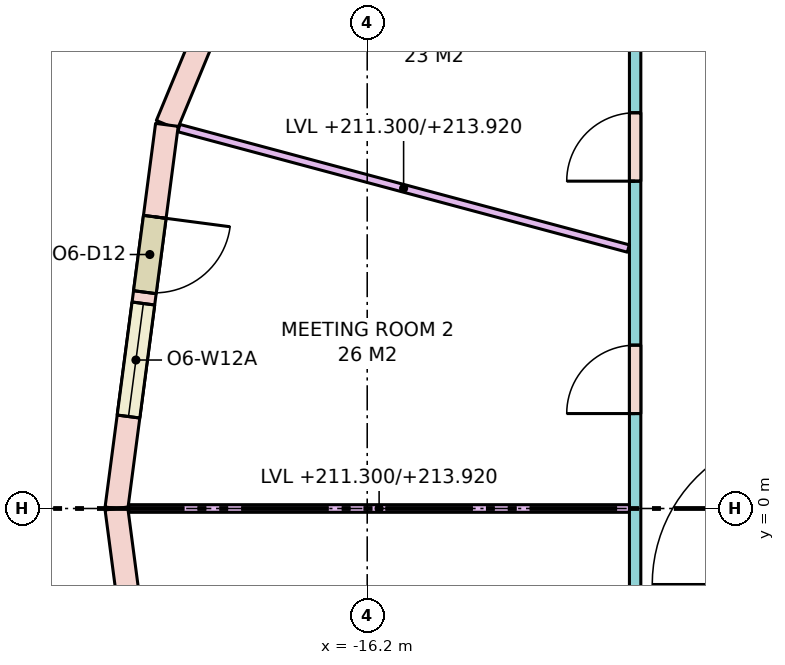
"""IFC4 building model, lengths in metres.
Left out: names, types, materials, properties, quantities, classifications, styles, units other than length and angle.
Written with IfcOpenShell. Run it as: python <this file> out.ifc"""

import sys

from ifc_helpers import new_model, si_unit, direction, frame, frame_2d, origin, place, context, subcontext, project, spatial, rectangle, extrude, element, fill, save


model = new_model("IFC4")
c1 = context("Model", 3, precision=1e-05, world=origin(), true_north=direction((0.0, 1.0)))
c2 = subcontext(c1, "Body", "Model", "MODEL_VIEW")
j1 = project(units=[si_unit("LENGTHUNIT", "METRE"), si_unit("PLANEANGLEUNIT", "RADIAN")], contexts=[c1])
p1 = place(None, origin())
s1 = spatial("IfcSite", under=j1, at=p1, CompositionType="ELEMENT")
p2 = place(p1, origin())
s2 = spatial("IfcBuilding", under=s1, at=p2, CompositionType="ELEMENT")
p3 = place(p2, frame((0.0, 0.0, 211.3)))
s3 = spatial("IfcBuildingStorey", under=s2, at=p3, CompositionType="ELEMENT", Elevation=211.3)
p4 = place(p3, frame((-16.887, 9.75, 0.0), z_axis=(0.0, 0.0, 1.0), x_axis=(-0.382724538613, -0.923862504675, 0.0)))
e1 = element("IfcWall", 1, at=p4, inside=s3, PredefinedType="STANDARD", context=c2, shape_type="SweptSolid", body=[
    extrude(rectangle(XDim=5.091, YDim=0.3, at=frame_2d((2.545, 0.0))), origin(), (0.0, 0.0, 1.0), 3.42),
])
p5 = place(p4, frame((1.345, 0.0, 0.8)))
e2 = element("IfcOpeningElement", 2, at=p5, cuts=e1, PredefinedType="OPENING", context=c2, shape_type="SweptSolid", body=[
    extrude(rectangle(XDim=2.4, YDim=2.4, at=frame_2d((1.2, 1.2))), frame((0.0, 0.16, 0.0), z_axis=(0.0, -1.0, 0.0), x_axis=(1.0, 0.0, 0.0)), (0.0, 0.0, 1.0), 0.32),
])
p6 = place(p3, frame((-18.836, 5.047, 0.0), z_axis=(0.0, 0.0, 1.0), x_axis=(-0.130495451964, -0.99144890792, 0.0)))
e3 = element("IfcWall", 3, at=p6, inside=s3, PredefinedType="STANDARD", context=c2, shape_type="SweptSolid", body=[
    extrude(rectangle(XDim=5.091, YDim=0.3, at=frame_2d((2.545, 0.0))), origin(), (0.0, 0.0, 1.0), 3.42),
])
p7 = place(p6, frame((1.22, 0.0, 0.0)))
e4 = element("IfcOpeningElement", 4, at=p7, cuts=e3, PredefinedType="OPENING", context=c2, shape_type="SweptSolid", body=[
    extrude(rectangle(XDim=1.0, YDim=2.4, at=frame_2d((0.5, 1.2))), frame((0.0, 0.16, 0.0), z_axis=(0.0, -1.0, 0.0), x_axis=(1.0, 0.0, 0.0)), (0.0, 0.0, 1.0), 0.32),
])
p8 = place(p6, frame((2.37, 0.0, 0.8)))
e5 = element("IfcOpeningElement", 5, at=p8, cuts=e3, PredefinedType="OPENING", context=c2, shape_type="SweptSolid", body=[
    extrude(rectangle(XDim=1.5, YDim=2.4, at=frame_2d((0.75, 1.2))), frame((0.0, 0.16, 0.0), z_axis=(0.0, -1.0, 0.0), x_axis=(1.0, 0.0, 0.0)), (0.0, 0.0, 1.0), 0.32),
])
p9 = place(p3, frame((-19.5, 0.0, 0.0), z_axis=(0.0, 0.0, 1.0), x_axis=(0.130495451964, -0.99144890792, 0.0)))
e6 = element("IfcWall", 6, at=p9, inside=s3, PredefinedType="STANDARD", context=c2, shape_type="SweptSolid", body=[
    extrude(rectangle(XDim=5.091, YDim=0.3, at=frame_2d((2.545, 0.0))), origin(), (0.0, 0.0, 1.0), 3.42),
])
p10 = place(p9, frame((1.345, 0.0, 0.8)))
e7 = element("IfcOpeningElement", 7, at=p10, cuts=e6, PredefinedType="OPENING", context=c2, shape_type="SweptSolid", body=[
    extrude(rectangle(XDim=2.4, YDim=2.4, at=frame_2d((1.2, 1.2))), frame((0.0, 0.16, 0.0), z_axis=(0.0, -1.0, 0.0), x_axis=(1.0, 0.0, 0.0)), (0.0, 0.0, 1.0), 0.32),
])
p11 = place(p3, frame((-12.675, -6.167, 0.0), z_axis=(0.0, 0.0, 1.0), x_axis=(0.0, 1.0, 0.0)))
e8 = element("IfcWall", 8, at=p11, inside=s3, PredefinedType="PARTITIONING", context=c2, shape_type="SweptSolid", body=[
    extrude(rectangle(XDim=12.333, YDim=0.15, at=frame_2d((6.167, 0.0))), origin(), (0.0, 0.0, 1.0), 2.62),
])
p12 = place(p11, frame((10.473, 0.0, 0.0)))
e9 = element("IfcOpeningElement", 9, at=p12, cuts=e8, PredefinedType="OPENING", context=c2, shape_type="SweptSolid", body=[
    extrude(rectangle(XDim=0.9, YDim=2.1, at=frame_2d((0.45, 1.05))), frame((0.0, 0.085, 0.0), z_axis=(0.0, -1.0, 0.0), x_axis=(1.0, 0.0, 0.0)), (0.0, 0.0, 1.0), 0.17),
])
p13 = place(p11, frame((7.416, 0.0, 0.0)))
e10 = element("IfcOpeningElement", 10, at=p13, cuts=e8, PredefinedType="OPENING", context=c2, shape_type="SweptSolid", body=[
    extrude(rectangle(XDim=0.9, YDim=2.1, at=frame_2d((0.45, 1.05))), frame((0.0, 0.085, 0.0), z_axis=(0.0, -1.0, 0.0), x_axis=(1.0, 0.0, 0.0)), (0.0, 0.0, 1.0), 0.17),
])
p14 = place(p11, frame((4.018, 0.0, 0.0)))
e11 = element("IfcOpeningElement", 11, at=p14, cuts=e8, PredefinedType="OPENING", context=c2, shape_type="SweptSolid", body=[
    extrude(rectangle(XDim=0.9, YDim=2.1, at=frame_2d((0.45, 1.05))), frame((0.0, 0.085, 0.0), z_axis=(0.0, -1.0, 0.0), x_axis=(1.0, 0.0, 0.0)), (0.0, 0.0, 1.0), 0.17),
])
p15 = place(p11, frame((0.46, 0.0, 0.0)))
e12 = element("IfcOpeningElement", 12, at=p15, cuts=e8, PredefinedType="OPENING", context=c2, shape_type="SweptSolid", body=[
    extrude(rectangle(XDim=1.8, YDim=2.1, at=frame_2d((0.9, 1.05))), frame((0.0, 0.085, 0.0), z_axis=(0.0, -1.0, 0.0), x_axis=(1.0, 0.0, 0.0)), (0.0, 0.0, 1.0), 0.17),
])
p16 = place(p3, frame((-12.764, 3.42, 0.0), z_axis=(0.0, 0.0, 1.0), x_axis=(-0.965925800266, 0.258819142221, 0.0)))
e13 = element("IfcWall", 13, at=p16, inside=s3, PredefinedType="PARTITIONING", context=c2, shape_type="SweptSolid", body=[
    extrude(rectangle(XDim=6.122, YDim=0.1, at=frame_2d((3.061, 0.0))), origin(), (0.0, 0.0, 1.0), 2.62),
])
p17 = place(p3, frame((-12.75, 0.0, 0.0), z_axis=(0.0, 0.0, 1.0), x_axis=(-1.0, 0.0, 0.0)))
e14 = element("IfcWall", 14, at=p17, inside=s3, PredefinedType="PARTITIONING", context=c2, shape_type="SweptSolid", body=[
    extrude(rectangle(XDim=6.587, YDim=0.1, at=frame_2d((3.293, 0.0))), origin(), (0.0, 0.0, 1.0), 2.62),
])
p18 = place(p7, origin())
e15 = element("IfcDoor", 15, at=p18, inside=s3, OperationType="SINGLE_SWING_LEFT", PredefinedType="DOOR", context=c2, shape_type="SweptSolid", body=[
    extrude(rectangle(XDim=1.0, YDim=2.4, at=frame_2d((0.5, 1.2))), frame((0.0, 0.025, 0.0), z_axis=(0.0, -1.0, 0.0), x_axis=(1.0, 0.0, 0.0)), (0.0, 0.0, 1.0), 0.05),
])
fill(e4, e15)
p19 = place(p8, origin())
e16 = element("IfcWindow", 16, at=p19, inside=s3, PartitioningType="SINGLE_PANEL", PredefinedType="WINDOW", context=c2, shape_type="SweptSolid", body=[
    extrude(rectangle(XDim=1.5, YDim=2.4, at=frame_2d((0.75, 1.2))), frame((0.0, 0.03, 0.0), z_axis=(0.0, -1.0, 0.0), x_axis=(1.0, 0.0, 0.0)), (0.0, 0.0, 1.0), 0.06),
])
fill(e5, e16)
p20 = place(p12, origin())
e17 = element("IfcDoor", 17, at=p20, inside=s3, OperationType="SINGLE_SWING_LEFT", PredefinedType="DOOR", context=c2, shape_type="SweptSolid", body=[
    extrude(rectangle(XDim=0.9, YDim=2.1, at=frame_2d((0.45, 1.05))), frame((0.0, 0.025, 0.0), z_axis=(0.0, -1.0, 0.0), x_axis=(1.0, 0.0, 0.0)), (0.0, 0.0, 1.0), 0.05),
])
fill(e9, e17)
p21 = place(p13, origin())
e18 = element("IfcDoor", 18, at=p21, inside=s3, OperationType="SINGLE_SWING_LEFT", PredefinedType="DOOR", context=c2, shape_type="SweptSolid", body=[
    extrude(rectangle(XDim=0.9, YDim=2.1, at=frame_2d((0.45, 1.05))), frame((0.0, 0.025, 0.0), z_axis=(0.0, -1.0, 0.0), x_axis=(1.0, 0.0, 0.0)), (0.0, 0.0, 1.0), 0.05),
])
fill(e10, e18)
save(model, sys.argv[1])
